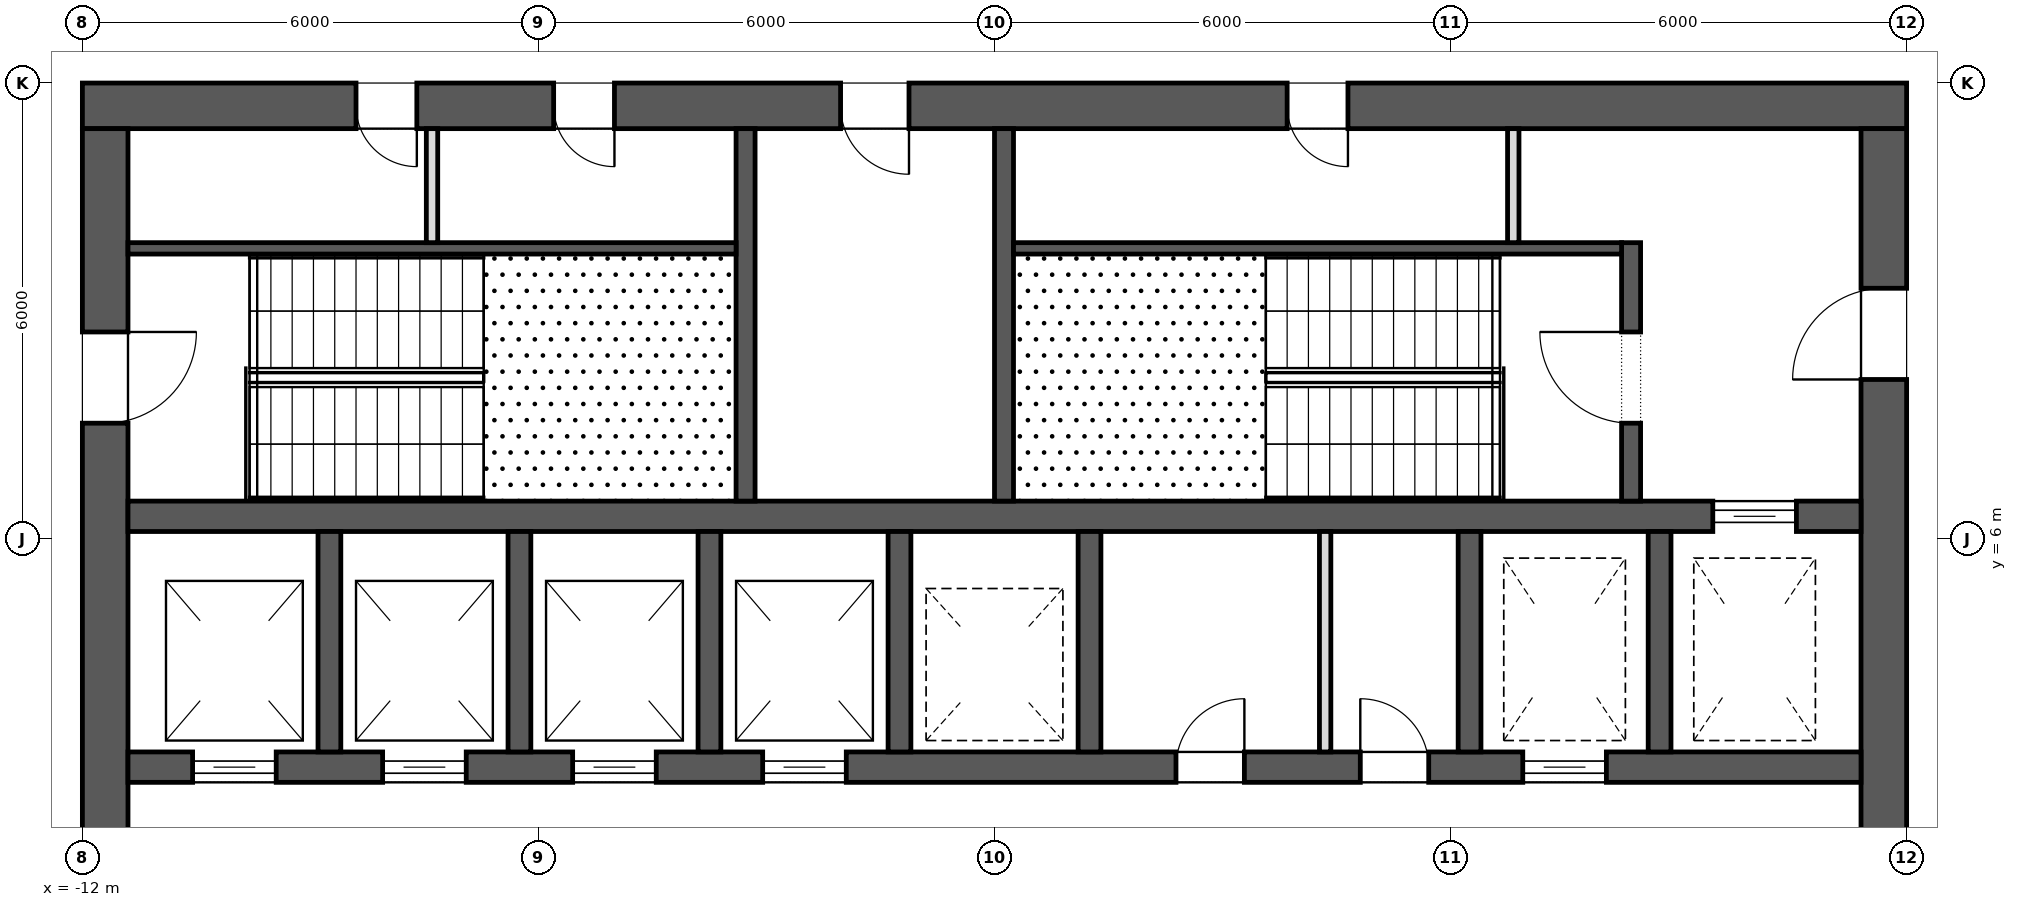
"""IFC4 building model, lengths in metres.
Left out: names, types, materials, properties, quantities, classifications, styles, units other than length and angle.
Written with IfcOpenShell. Run it as: python <this file> out.ifc"""

import sys

from ifc_helpers import new_model, si_unit, direction, frame, frame_2d, origin, place, context, subcontext, project, spatial, rectangle, extrude, element, fill, save


model = new_model("IFC4")
c1 = context("Model", 3, precision=1e-05, world=origin(), true_north=direction((0.0, 1.0)))
c2 = subcontext(c1, "Body", "Model", "MODEL_VIEW")
j1 = project(units=[si_unit("LENGTHUNIT", "METRE"), si_unit("PLANEANGLEUNIT", "RADIAN")], contexts=[c1])
p1 = place(None, origin())
s1 = spatial("IfcSite", under=j1, at=p1, CompositionType="ELEMENT")
p2 = place(p1, origin())
s2 = spatial("IfcBuilding", under=s1, at=p2, CompositionType="ELEMENT")
p3 = place(p2, frame((0.0, 0.0, 214.9)))
s3 = spatial("IfcBuildingStorey", under=s2, at=p3, CompositionType="ELEMENT", Elevation=214.9)
p4 = place(p3, frame((-12.0, 11.7, 0.0), z_axis=(0.0, 0.0, 1.0), x_axis=(1.0, 0.0, 0.0)))
e1 = element("IfcWall", 1, at=p4, inside=s3, PredefinedType="SHEAR", context=c2, shape_type="SweptSolid", body=[
    extrude(rectangle(XDim=24.0, YDim=0.6, at=frame_2d((12.0, 0.0))), origin(), (0.0, 0.0, 1.0), 4.0),
])
p5 = place(p4, frame((9.975, 0.0, 0.0)))
e2 = element("IfcOpeningElement", 2, at=p5, cuts=e1, PredefinedType="OPENING", context=c2, shape_type="SweptSolid", body=[
    extrude(rectangle(XDim=0.9, YDim=2.1, at=frame_2d((0.45, 1.05))), frame((0.0, 0.312, 0.0), z_axis=(0.0, -1.0, 0.0), x_axis=(1.0, 0.0, 0.0)), (0.0, 0.0, 1.0), 0.624),
])
p6 = place(p4, frame((3.6, 0.0, 0.0)))
e3 = element("IfcOpeningElement", 3, at=p6, cuts=e1, PredefinedType="OPENING", context=c2, shape_type="SweptSolid", body=[
    extrude(rectangle(XDim=0.8, YDim=2.1, at=frame_2d((0.4, 1.05))), frame((0.0, 0.312, 0.0), z_axis=(0.0, -1.0, 0.0), x_axis=(1.0, 0.0, 0.0)), (0.0, 0.0, 1.0), 0.624),
])
p7 = place(p4, frame((6.2, 0.0, 0.0)))
e4 = element("IfcOpeningElement", 4, at=p7, cuts=e1, PredefinedType="OPENING", context=c2, shape_type="SweptSolid", body=[
    extrude(rectangle(XDim=0.8, YDim=2.1, at=frame_2d((0.4, 1.05))), frame((0.0, 0.312, 0.0), z_axis=(0.0, -1.0, 0.0), x_axis=(1.0, 0.0, 0.0)), (0.0, 0.0, 1.0), 0.624),
])
p8 = place(p4, frame((15.85, 0.0, 0.0)))
e5 = element("IfcOpeningElement", 5, at=p8, cuts=e1, PredefinedType="OPENING", context=c2, shape_type="SweptSolid", body=[
    extrude(rectangle(XDim=0.8, YDim=2.1, at=frame_2d((0.4, 1.05))), frame((0.0, 0.312, 0.0), z_axis=(0.0, -1.0, 0.0), x_axis=(1.0, 0.0, 0.0)), (0.0, 0.0, 1.0), 0.624),
])
p9 = place(p3, frame((11.7, -11.4, 0.0), z_axis=(0.0, 0.0, 1.0), x_axis=(0.0, 1.0, 0.0)))
e6 = element("IfcWall", 6, at=p9, inside=s3, PredefinedType="SHEAR", context=c2, shape_type="SweptSolid", body=[
    extrude(rectangle(XDim=22.8, YDim=0.6, at=frame_2d((11.4, 0.0))), origin(), (0.0, 0.0, 1.0), 4.0),
])
p10 = place(p9, frame((10.2, 0.0, 0.0)))
e7 = element("IfcOpeningElement", 7, at=p10, cuts=e6, PredefinedType="OPENING", context=c2, shape_type="SweptSolid", body=[
    extrude(rectangle(XDim=2.4, YDim=2.1, at=frame_2d((1.2, 1.05))), frame((0.0, 0.312, 0.0), z_axis=(0.0, -1.0, 0.0), x_axis=(1.0, 0.0, 0.0)), (0.0, 0.0, 1.0), 0.624),
])
p11 = place(p9, frame((19.5, 0.0, 0.0)))
e8 = element("IfcOpeningElement", 8, at=p11, cuts=e6, PredefinedType="OPENING", context=c2, shape_type="SweptSolid", body=[
    extrude(rectangle(XDim=1.2, YDim=2.1, at=frame_2d((0.6, 1.05))), frame((0.0, 0.312, 0.0), z_axis=(0.0, -1.0, 0.0), x_axis=(1.0, 0.0, 0.0)), (0.0, 0.0, 1.0), 0.624),
])
p12 = place(p9, frame((2.1, 0.0, 0.0)))
e9 = element("IfcOpeningElement", 9, at=p12, cuts=e6, PredefinedType="OPENING", context=c2, shape_type="SweptSolid", body=[
    extrude(rectangle(XDim=1.2, YDim=2.1, at=frame_2d((0.6, 1.05))), frame((0.0, 0.312, 0.0), z_axis=(0.0, -1.0, 0.0), x_axis=(1.0, 0.0, 0.0)), (0.0, 0.0, 1.0), 0.624),
])
p13 = place(p3, frame((-11.7, -11.4, 0.0), z_axis=(0.0, 0.0, 1.0), x_axis=(0.0, 1.0, 0.0)))
e10 = element("IfcWall", 10, at=p13, inside=s3, PredefinedType="SHEAR", context=c2, shape_type="SweptSolid", body=[
    extrude(rectangle(XDim=22.8, YDim=0.6, at=frame_2d((11.4, 0.0))), origin(), (0.0, 0.0, 1.0), 4.0),
])
p14 = place(p13, frame((10.2, 0.0, 0.0)))
e11 = element("IfcOpeningElement", 11, at=p14, cuts=e10, PredefinedType="OPENING", context=c2, shape_type="SweptSolid", body=[
    extrude(rectangle(XDim=2.4, YDim=2.1, at=frame_2d((1.2, 1.05))), frame((0.0, 0.312, 0.0), z_axis=(0.0, -1.0, 0.0), x_axis=(1.0, 0.0, 0.0)), (0.0, 0.0, 1.0), 0.624),
])
p15 = place(p13, frame((18.925, 0.0, 0.0)))
e12 = element("IfcOpeningElement", 12, at=p15, cuts=e10, PredefinedType="OPENING", context=c2, shape_type="SweptSolid", body=[
    extrude(rectangle(XDim=1.2, YDim=2.1, at=frame_2d((0.6, 1.05))), frame((0.0, 0.312, 0.0), z_axis=(0.0, -1.0, 0.0), x_axis=(1.0, 0.0, 0.0)), (0.0, 0.0, 1.0), 0.624),
])
p16 = place(p13, frame((2.675, 0.0, 0.0)))
e13 = element("IfcOpeningElement", 13, at=p16, cuts=e10, PredefinedType="OPENING", context=c2, shape_type="SweptSolid", body=[
    extrude(rectangle(XDim=1.2, YDim=2.1, at=frame_2d((0.6, 1.05))), frame((0.0, 0.312, 0.0), z_axis=(0.0, -1.0, 0.0), x_axis=(1.0, 0.0, 0.0)), (0.0, 0.0, 1.0), 0.624),
])
p17 = place(p3, frame((-11.4, 3.0, 0.0), z_axis=(0.0, 0.0, 1.0), x_axis=(1.0, 0.0, 0.0)))
e14 = element("IfcWall", 14, at=p17, inside=s3, PredefinedType="SHEAR", context=c2, shape_type="SweptSolid", body=[
    extrude(rectangle(XDim=22.8, YDim=0.4, at=frame_2d((11.4, 0.0))), origin(), (0.0, 0.0, 1.0), 4.0),
])
p18 = place(p17, frame((0.85, 0.0, 0.0)))
e15 = element("IfcOpeningElement", 15, at=p18, cuts=e14, PredefinedType="OPENING", context=c2, shape_type="SweptSolid", body=[
    extrude(rectangle(XDim=1.1, YDim=2.1, at=frame_2d((0.55, 1.05))), frame((0.0, 0.212, 0.0), z_axis=(0.0, -1.0, 0.0), x_axis=(1.0, 0.0, 0.0)), (0.0, 0.0, 1.0), 0.424),
])
p19 = place(p17, frame((3.35, 0.0, 0.0)))
e16 = element("IfcOpeningElement", 16, at=p19, cuts=e14, PredefinedType="OPENING", context=c2, shape_type="SweptSolid", body=[
    extrude(rectangle(XDim=1.1, YDim=2.1, at=frame_2d((0.55, 1.05))), frame((0.0, 0.212, 0.0), z_axis=(0.0, -1.0, 0.0), x_axis=(1.0, 0.0, 0.0)), (0.0, 0.0, 1.0), 0.424),
])
p20 = place(p17, frame((5.85, 0.0, 0.0)))
e17 = element("IfcOpeningElement", 17, at=p20, cuts=e14, PredefinedType="OPENING", context=c2, shape_type="SweptSolid", body=[
    extrude(rectangle(XDim=1.1, YDim=2.1, at=frame_2d((0.55, 1.05))), frame((0.0, 0.212, 0.0), z_axis=(0.0, -1.0, 0.0), x_axis=(1.0, 0.0, 0.0)), (0.0, 0.0, 1.0), 0.424),
])
p21 = place(p17, frame((8.35, 0.0, 0.0)))
e18 = element("IfcOpeningElement", 18, at=p21, cuts=e14, PredefinedType="OPENING", context=c2, shape_type="SweptSolid", body=[
    extrude(rectangle(XDim=1.1, YDim=2.1, at=frame_2d((0.55, 1.05))), frame((0.0, 0.212, 0.0), z_axis=(0.0, -1.0, 0.0), x_axis=(1.0, 0.0, 0.0)), (0.0, 0.0, 1.0), 0.424),
])
p22 = place(p17, frame((18.35, 0.0, 0.0)))
e19 = element("IfcOpeningElement", 19, at=p22, cuts=e14, PredefinedType="OPENING", context=c2, shape_type="SweptSolid", body=[
    extrude(rectangle(XDim=1.1, YDim=2.1, at=frame_2d((0.55, 1.05))), frame((0.0, 0.212, 0.0), z_axis=(0.0, -1.0, 0.0), x_axis=(1.0, 0.0, 0.0)), (0.0, 0.0, 1.0), 0.424),
])
p23 = place(p17, frame((13.788, 0.0, 0.0)))
e20 = element("IfcOpeningElement", 20, at=p23, cuts=e14, PredefinedType="OPENING", context=c2, shape_type="SweptSolid", body=[
    extrude(rectangle(XDim=0.9, YDim=2.1, at=frame_2d((0.45, 1.05))), frame((0.0, 0.212, 0.0), z_axis=(0.0, -1.0, 0.0), x_axis=(1.0, 0.0, 0.0)), (0.0, 0.0, 1.0), 0.424),
])
p24 = place(p17, frame((16.212, 0.0, 0.0)))
e21 = element("IfcOpeningElement", 21, at=p24, cuts=e14, PredefinedType="OPENING", context=c2, shape_type="SweptSolid", body=[
    extrude(rectangle(XDim=0.9, YDim=2.1, at=frame_2d((0.45, 1.05))), frame((0.0, 0.212, 0.0), z_axis=(0.0, -1.0, 0.0), x_axis=(1.0, 0.0, 0.0)), (0.0, 0.0, 1.0), 0.424),
])
p25 = place(p3, frame((-11.4, 6.3, 0.0), z_axis=(0.0, 0.0, 1.0), x_axis=(1.0, 0.0, 0.0)))
e22 = element("IfcWall", 22, at=p25, inside=s3, PredefinedType="SHEAR", context=c2, shape_type="SweptSolid", body=[
    extrude(rectangle(XDim=22.8, YDim=0.4, at=frame_2d((11.4, 0.0))), origin(), (0.0, 0.0, 1.0), 4.0),
])
p26 = place(p25, frame((20.85, 0.0, 0.0)))
e23 = element("IfcOpeningElement", 23, at=p26, cuts=e22, PredefinedType="OPENING", context=c2, shape_type="SweptSolid", body=[
    extrude(rectangle(XDim=1.1, YDim=2.1, at=frame_2d((0.55, 1.05))), frame((0.0, 0.212, 0.0), z_axis=(0.0, -1.0, 0.0), x_axis=(1.0, 0.0, 0.0)), (0.0, 0.0, 1.0), 0.424),
])
for number, where, z_axis, x_axis in (
    (24, (-8.75, 3.2, 0.0), (0.0, 0.0, 1.0), (0.0, 1.0, 0.0)),
    (25, (-6.25, 3.2, 0.0), (0.0, 0.0, 1.0), (0.0, 1.0, 0.0)),
    (26, (-3.75, 3.2, 0.0), (0.0, 0.0, 1.0), (0.0, 1.0, 0.0)),
    (27, (-1.25, 3.2, 0.0), (0.0, 0.0, 1.0), (0.0, 1.0, 0.0)),
    (28, (1.25, 3.2, 0.0), (0.0, 0.0, 1.0), (0.0, 1.0, 0.0)),
    (29, (6.25, 3.2, 0.0), (0.0, 0.0, 1.0), (0.0, 1.0, 0.0)),
    (30, (8.75, 3.2, 0.0), (0.0, 0.0, 1.0), (0.0, 1.0, 0.0)),
):
    element("IfcWall", number, at=place(p3, frame(where, z_axis=z_axis, x_axis=x_axis)), inside=s3, PredefinedType="SHEAR", context=c2, shape_type="SweptSolid", body=[
        extrude(rectangle(XDim=2.9, YDim=0.3, at=frame_2d((1.45, 0.0))), origin(), (0.0, 0.0, 1.0), 4.0),
    ])
for number, where, z_axis, x_axis in (
    (31, (-3.275, 6.5, 0.0), (0.0, 0.0, 1.0), (0.0, 1.0, 0.0)),
    (32, (0.125, 6.5, 0.0), (0.0, 0.0, 1.0), (0.0, 1.0, 0.0)),
):
    element("IfcWall", number, at=place(p3, frame(where, z_axis=z_axis, x_axis=x_axis)), inside=s3, PredefinedType="SHEAR", context=c2, shape_type="SweptSolid", body=[
        extrude(rectangle(XDim=4.9, YDim=0.25, at=frame_2d((2.45, 0.0))), origin(), (0.0, 0.0, 1.0), 3.7),
    ])
p27 = place(p3, frame((8.375, 6.5, 0.0), z_axis=(0.0, 0.0, 1.0), x_axis=(0.0, 1.0, 0.0)))
e33 = element("IfcWall", 33, at=p27, inside=s3, PredefinedType="SHEAR", context=c2, shape_type="SweptSolid", body=[
    extrude(rectangle(XDim=3.4, YDim=0.25, at=frame_2d((1.7, 0.0))), origin(), (0.0, 0.0, 1.0), 3.7),
])
p28 = place(p27, frame((1.025, 0.0, 0.0)))
e34 = element("IfcOpeningElement", 34, at=p28, cuts=e33, PredefinedType="OPENING", context=c2, shape_type="SweptSolid", body=[
    extrude(rectangle(XDim=1.2, YDim=2.1, at=frame_2d((0.6, 1.05))), frame((0.0, 0.137, 0.0), z_axis=(0.0, -1.0, 0.0), x_axis=(1.0, 0.0, 0.0)), (0.0, 0.0, 1.0), 0.274),
])
for number, where, z_axis, x_axis in (
    (35, (-11.4, 9.825, 0.0), (0.0, 0.0, 1.0), (1.0, 0.0, 0.0)),
    (36, (0.25, 9.825, 0.0), (0.0, 0.0, 1.0), (1.0, 0.0, 0.0)),
):
    element("IfcWall", number, at=place(p3, frame(where, z_axis=z_axis, x_axis=x_axis)), inside=s3, PredefinedType="SHEAR", context=c2, shape_type="SweptSolid", body=[
        extrude(rectangle(XDim=8.0, YDim=0.15, at=frame_2d((4.0, 0.0))), origin(), (0.0, 0.0, 1.0), 3.7),
    ])
for number, where, z_axis, x_axis in (
    (37, (-7.4, 9.9, 0.0), (0.0, 0.0, 1.0), (0.0, 1.0, 0.0)),
    (38, (6.825, 9.9, 0.0), (0.0, 0.0, 1.0), (0.0, 1.0, 0.0)),
):
    element("IfcWall", number, at=place(p3, frame(where, z_axis=z_axis, x_axis=x_axis)), inside=s3, PredefinedType="PARTITIONING", context=c2, shape_type="SweptSolid", body=[
        extrude(rectangle(XDim=1.5, YDim=0.15, at=frame_2d((0.75, 0.0))), origin(), (0.0, 0.0, 1.0), 3.7),
    ])
p29 = place(p3, frame((4.35, 3.2, 0.0), z_axis=(0.0, 0.0, 1.0), x_axis=(0.0, 1.0, 0.0)))
e39 = element("IfcWall", 39, at=p29, inside=s3, PredefinedType="PARTITIONING", context=c2, shape_type="SweptSolid", body=[
    extrude(rectangle(XDim=2.9, YDim=0.15, at=frame_2d((1.45, 0.0))), origin(), (0.0, 0.0, 1.0), 3.7),
])
p30 = place(p26, origin())
e40 = element("IfcDoor", 40, at=p30, inside=s3, OperationType="SLIDING_TO_LEFT", PredefinedType="DOOR", context=c2, shape_type="SweptSolid", body=[
    extrude(rectangle(XDim=1.1, YDim=2.1, at=frame_2d((0.55, 1.05))), frame((0.0, 0.025, 0.0), z_axis=(0.0, -1.0, 0.0), x_axis=(1.0, 0.0, 0.0)), (0.0, 0.0, 1.0), 0.05),
])
fill(e23, e40)
p31 = place(p18, origin())
e41 = element("IfcDoor", 41, at=p31, inside=s3, OperationType="SLIDING_TO_LEFT", PredefinedType="DOOR", context=c2, shape_type="SweptSolid", body=[
    extrude(rectangle(XDim=1.1, YDim=2.1, at=frame_2d((0.55, 1.05))), frame((0.0, 0.025, 0.0), z_axis=(0.0, -1.0, 0.0), x_axis=(1.0, 0.0, 0.0)), (0.0, 0.0, 1.0), 0.05),
])
fill(e15, e41)
p32 = place(p19, origin())
e42 = element("IfcDoor", 42, at=p32, inside=s3, OperationType="SLIDING_TO_LEFT", PredefinedType="DOOR", context=c2, shape_type="SweptSolid", body=[
    extrude(rectangle(XDim=1.1, YDim=2.1, at=frame_2d((0.55, 1.05))), frame((0.0, 0.025, 0.0), z_axis=(0.0, -1.0, 0.0), x_axis=(1.0, 0.0, 0.0)), (0.0, 0.0, 1.0), 0.05),
])
fill(e16, e42)
p33 = place(p20, origin())
e43 = element("IfcDoor", 43, at=p33, inside=s3, OperationType="SLIDING_TO_LEFT", PredefinedType="DOOR", context=c2, shape_type="SweptSolid", body=[
    extrude(rectangle(XDim=1.1, YDim=2.1, at=frame_2d((0.55, 1.05))), frame((0.0, 0.025, 0.0), z_axis=(0.0, -1.0, 0.0), x_axis=(1.0, 0.0, 0.0)), (0.0, 0.0, 1.0), 0.05),
])
fill(e17, e43)
p34 = place(p21, origin())
e44 = element("IfcDoor", 44, at=p34, inside=s3, OperationType="SLIDING_TO_LEFT", PredefinedType="DOOR", context=c2, shape_type="SweptSolid", body=[
    extrude(rectangle(XDim=1.1, YDim=2.1, at=frame_2d((0.55, 1.05))), frame((0.0, 0.025, 0.0), z_axis=(0.0, -1.0, 0.0), x_axis=(1.0, 0.0, 0.0)), (0.0, 0.0, 1.0), 0.05),
])
fill(e18, e44)
p35 = place(p22, origin())
e45 = element("IfcDoor", 45, at=p35, inside=s3, OperationType="SLIDING_TO_LEFT", PredefinedType="DOOR", context=c2, shape_type="SweptSolid", body=[
    extrude(rectangle(XDim=1.1, YDim=2.1, at=frame_2d((0.55, 1.05))), frame((0.0, 0.025, 0.0), z_axis=(0.0, -1.0, 0.0), x_axis=(1.0, 0.0, 0.0)), (0.0, 0.0, 1.0), 0.05),
])
fill(e19, e45)
p36 = place(p15, frame((1.2, 0.0, 0.0), z_axis=(0.0, 0.0, 1.0), x_axis=(-1.0, 0.0, 0.0)))
e46 = element("IfcDoor", 46, at=p36, inside=s3, OperationType="SINGLE_SWING_RIGHT", PredefinedType="DOOR", context=c2, shape_type="SweptSolid", body=[
    extrude(rectangle(XDim=1.2, YDim=2.1, at=frame_2d((0.6, 1.05))), frame((0.0, 0.025, 0.0), z_axis=(0.0, -1.0, 0.0), x_axis=(1.0, 0.0, 0.0)), (0.0, 0.0, 1.0), 0.05),
])
fill(e12, e46)
p37 = place(p28, origin())
e47 = element("IfcDoor", 47, at=p37, inside=s3, OperationType="SINGLE_SWING_LEFT", PredefinedType="DOOR", context=c2, shape_type="SweptSolid", body=[
    extrude(rectangle(XDim=1.2, YDim=2.1, at=frame_2d((0.6, 1.05))), frame((0.0, 0.025, 0.0), z_axis=(0.0, -1.0, 0.0), x_axis=(1.0, 0.0, 0.0)), (0.0, 0.0, 1.0), 0.05),
])
fill(e34, e47)
p38 = place(p11, origin())
e48 = element("IfcDoor", 48, at=p38, inside=s3, OperationType="SINGLE_SWING_RIGHT", PredefinedType="DOOR", context=c2, shape_type="SweptSolid", body=[
    extrude(rectangle(XDim=1.2, YDim=2.1, at=frame_2d((0.6, 1.05))), frame((0.0, 0.025, 0.0), z_axis=(0.0, -1.0, 0.0), x_axis=(1.0, 0.0, 0.0)), (0.0, 0.0, 1.0), 0.05),
])
fill(e8, e48)
p39 = place(p5, frame((0.9, 0.0, 0.0), z_axis=(0.0, 0.0, 1.0), x_axis=(-1.0, 0.0, 0.0)))
e49 = element("IfcDoor", 49, at=p39, inside=s3, OperationType="SINGLE_SWING_RIGHT", PredefinedType="DOOR", context=c2, shape_type="SweptSolid", body=[
    extrude(rectangle(XDim=0.9, YDim=2.1, at=frame_2d((0.45, 1.05))), frame((0.0, 0.025, 0.0), z_axis=(0.0, -1.0, 0.0), x_axis=(1.0, 0.0, 0.0)), (0.0, 0.0, 1.0), 0.05),
])
fill(e2, e49)
p40 = place(p6, frame((0.8, 0.0, 0.0), z_axis=(0.0, 0.0, 1.0), x_axis=(-1.0, 0.0, 0.0)))
e50 = element("IfcDoor", 50, at=p40, inside=s3, OperationType="SINGLE_SWING_RIGHT", PredefinedType="DOOR", context=c2, shape_type="SweptSolid", body=[
    extrude(rectangle(XDim=0.8, YDim=2.1, at=frame_2d((0.4, 1.05))), frame((0.0, 0.025, 0.0), z_axis=(0.0, -1.0, 0.0), x_axis=(1.0, 0.0, 0.0)), (0.0, 0.0, 1.0), 0.05),
])
fill(e3, e50)
p41 = place(p7, frame((0.8, 0.0, 0.0), z_axis=(0.0, 0.0, 1.0), x_axis=(-1.0, 0.0, 0.0)))
e51 = element("IfcDoor", 51, at=p41, inside=s3, OperationType="SINGLE_SWING_RIGHT", PredefinedType="DOOR", context=c2, shape_type="SweptSolid", body=[
    extrude(rectangle(XDim=0.8, YDim=2.1, at=frame_2d((0.4, 1.05))), frame((0.0, 0.025, 0.0), z_axis=(0.0, -1.0, 0.0), x_axis=(1.0, 0.0, 0.0)), (0.0, 0.0, 1.0), 0.05),
])
fill(e4, e51)
p42 = place(p8, frame((0.8, 0.0, 0.0), z_axis=(0.0, 0.0, 1.0), x_axis=(-1.0, 0.0, 0.0)))
e52 = element("IfcDoor", 52, at=p42, inside=s3, OperationType="SINGLE_SWING_RIGHT", PredefinedType="DOOR", context=c2, shape_type="SweptSolid", body=[
    extrude(rectangle(XDim=0.8, YDim=2.1, at=frame_2d((0.4, 1.05))), frame((0.0, 0.025, 0.0), z_axis=(0.0, -1.0, 0.0), x_axis=(1.0, 0.0, 0.0)), (0.0, 0.0, 1.0), 0.05),
])
fill(e5, e52)
p43 = place(p23, origin())
e53 = element("IfcDoor", 53, at=p43, inside=s3, OperationType="SINGLE_SWING_LEFT", PredefinedType="DOOR", context=c2, shape_type="SweptSolid", body=[
    extrude(rectangle(XDim=0.9, YDim=2.1, at=frame_2d((0.45, 1.05))), frame((0.0, 0.025, 0.0), z_axis=(0.0, -1.0, 0.0), x_axis=(1.0, 0.0, 0.0)), (0.0, 0.0, 1.0), 0.05),
])
fill(e20, e53)
p44 = place(p24, origin())
e54 = element("IfcDoor", 54, at=p44, inside=s3, OperationType="SINGLE_SWING_RIGHT", PredefinedType="DOOR", context=c2, shape_type="SweptSolid", body=[
    extrude(rectangle(XDim=0.9, YDim=2.1, at=frame_2d((0.45, 1.05))), frame((0.0, 0.025, 0.0), z_axis=(0.0, -1.0, 0.0), x_axis=(1.0, 0.0, 0.0)), (0.0, 0.0, 1.0), 0.05),
])
fill(e21, e54)
save(model, sys.argv[1])
